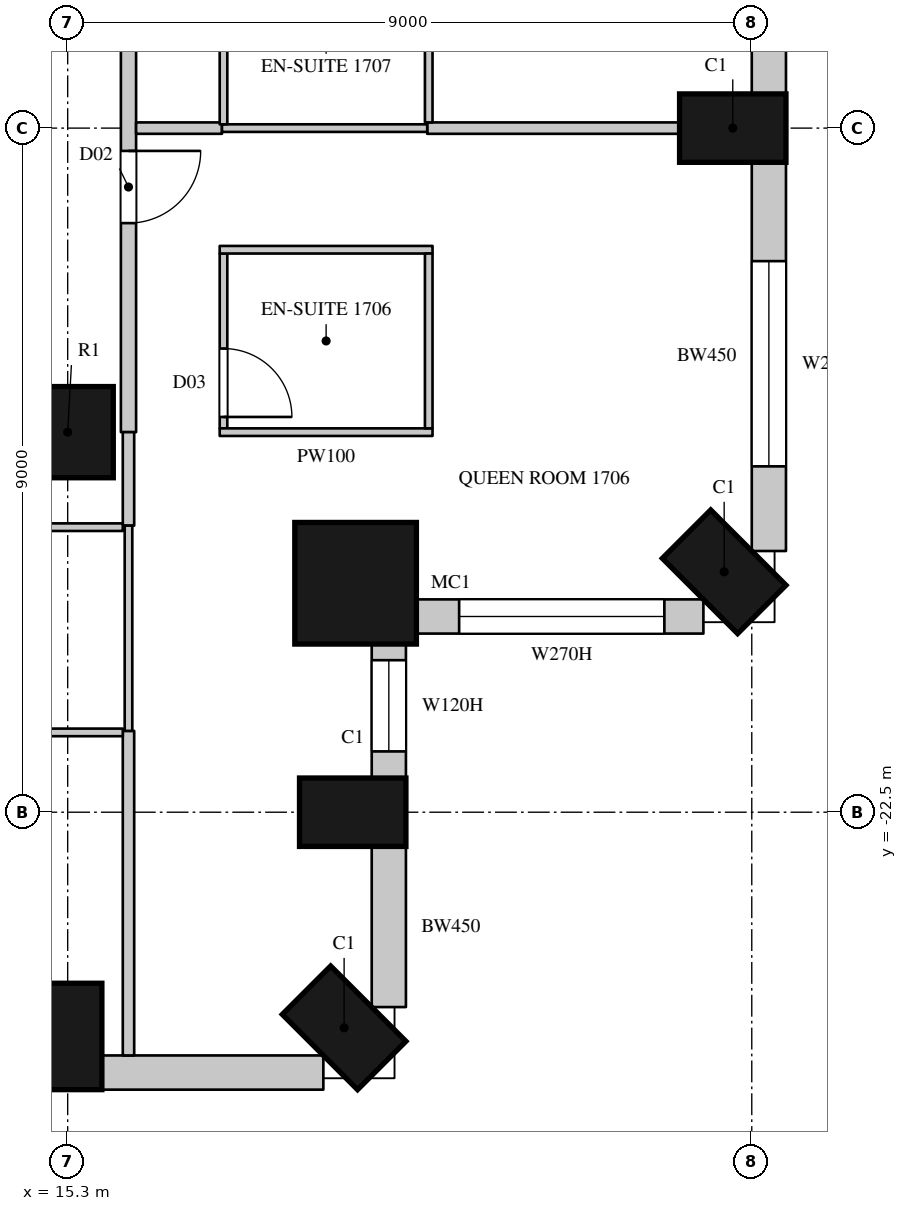
"""IFC4 building model, lengths in metres.
Left out: names, types, materials, properties, quantities, classifications, styles, units other than length and angle.
Written with IfcOpenShell. Run it as: python <this file> out.ifc"""

import sys

from ifc_helpers import new_model, si_unit, direction, frame, frame_2d, origin, origin_2d, place, context, subcontext, project, spatial, rectangle, circle, extrude, element, fill, save


model = new_model("IFC4")
c1 = context("Model", 3, precision=1e-05, world=origin(), true_north=direction((0.0, 1.0)))
c2 = subcontext(c1, "Body", "Model", "MODEL_VIEW")
j1 = project(units=[si_unit("LENGTHUNIT", "METRE"), si_unit("PLANEANGLEUNIT", "RADIAN")], contexts=[c1])
p1 = place(None, origin())
s1 = spatial("IfcSite", under=j1, at=p1, CompositionType="ELEMENT")
p2 = place(p1, origin())
s2 = spatial("IfcBuilding", under=s1, at=p2, CompositionType="ELEMENT")
p3 = place(p2, frame((0.0, 0.0, 91.5)))
s3 = spatial("IfcBuildingStorey", under=s2, at=p3, CompositionType="ELEMENT", Elevation=91.5)
for number, where, z_axis, x_axis in (
    (1, (15.3, -25.45, 0.0), (0.0, 0.0, 1.0), (1.0, 0.0, 0.0)),
    (2, (18.937, -25.337, 0.0), (0.0, 0.0, 1.0), (0.707, 0.707, 0.0)),
    (3, (19.05, -22.5, 0.0), (0.0, 0.0, 1.0), (0.0, 1.0, 0.0)),
):
    element("IfcColumn", number, at=place(p3, frame(where, z_axis=z_axis, x_axis=x_axis)), inside=s3, PredefinedType="COLUMN", context=c2, shape_type="SweptSolid", body=[
        extrude(rectangle(XDim=0.9, YDim=1.4, at=origin_2d()), origin(), (0.0, 0.0, 1.0), 3.6),
    ])
p4 = place(p3, frame((19.088, -19.488, 0.0), z_axis=(0.0, 0.0, 1.0), x_axis=(1.0, 0.0, 0.0)))
e4 = element("IfcColumn", 4, at=p4, inside=s3, PredefinedType="COLUMN", context=c2, shape_type="SweptSolid", body=[
    extrude(circle(Radius=0.8, at=origin_2d()), origin(), (0.0, 0.0, 1.0), 3.6),
])
for number, where, z_axis, x_axis in (
    (5, (23.937, -19.337, 0.0), (0.0, 0.0, 1.0), (0.707, 0.707, 0.0)),
    (6, (24.05, -13.5, 0.0), (0.0, 0.0, 1.0), (0.0, 1.0, 0.0)),
):
    element("IfcColumn", number, at=place(p3, frame(where, z_axis=z_axis, x_axis=x_axis)), inside=s3, PredefinedType="COLUMN", context=c2, shape_type="SweptSolid", body=[
        extrude(rectangle(XDim=0.9, YDim=1.4, at=origin_2d()), origin(), (0.0, 0.0, 1.0), 3.6),
    ])
p5 = place(p3, frame((15.3, -17.5, 0.0), z_axis=(0.0, 0.0, 1.0), x_axis=(1.0, 0.0, 0.0)))
e7 = element("IfcColumn", 7, at=p5, inside=s3, PredefinedType="COLUMN", context=c2, shape_type="SweptSolid", body=[
    extrude(circle(Radius=0.6, at=origin_2d()), origin(), (0.0, 0.0, 1.0), 3.6),
])
p6 = place(p3, frame((15.75, -25.925, 0.0), z_axis=(0.0, 0.0, 1.0), x_axis=(1.0, 0.0, 0.0)))
e8 = element("IfcWall", 8, at=p6, inside=s3, PredefinedType="SOLIDWALL", context=c2, shape_type="SweptSolid", body=[
    extrude(rectangle(XDim=2.914, YDim=0.45, at=frame_2d((1.457, 0.0))), origin(), (0.0, 0.0, 1.0), 3.3),
])
p7 = place(p3, frame((19.525, -25.064, 0.0), z_axis=(0.0, 0.0, 1.0), x_axis=(0.0, 1.0, 0.0)))
e9 = element("IfcWall", 9, at=p7, inside=s3, PredefinedType="SOLIDWALL", context=c2, shape_type="SweptSolid", body=[
    extrude(rectangle(XDim=2.114, YDim=0.45, at=frame_2d((1.057, 0.0))), origin(), (0.0, 0.0, 1.0), 3.3),
])
p8 = place(p3, frame((19.525, -22.05, 0.0), z_axis=(0.0, 0.0, 1.0), x_axis=(0.0, 1.0, 0.0)))
e10 = element("IfcWall", 10, at=p8, inside=s3, PredefinedType="SOLIDWALL", context=c2, shape_type="SweptSolid", body=[
    extrude(rectangle(XDim=1.792, YDim=0.45, at=frame_2d((0.896, 0.0))), origin(), (0.0, 0.0, 1.0), 3.3),
])
p9 = place(p8, frame((0.35, 0.0, 1.05)))
e11 = element("IfcOpeningElement", 11, at=p9, cuts=e10, PredefinedType="OPENING", context=c2, shape_type="SweptSolid", body=[
    extrude(rectangle(XDim=1.2, YDim=2.0, at=frame_2d((0.6, 1.0))), frame((0.0, 0.235, 0.0), z_axis=(0.0, -1.0, 0.0), x_axis=(1.0, 0.0, 0.0)), (0.0, 0.0, 1.0), 0.47),
])
p10 = place(p3, frame((19.858, -19.925, 0.0), z_axis=(0.0, 0.0, 1.0), x_axis=(1.0, 0.0, 0.0)))
e12 = element("IfcWall", 12, at=p10, inside=s3, PredefinedType="SOLIDWALL", context=c2, shape_type="SweptSolid", body=[
    extrude(rectangle(XDim=3.805, YDim=0.45, at=frame_2d((1.903, 0.0))), origin(), (0.0, 0.0, 1.0), 3.3),
])
p11 = place(p10, frame((0.592, 0.0, 1.05)))
e13 = element("IfcOpeningElement", 13, at=p11, cuts=e12, PredefinedType="OPENING", context=c2, shape_type="SweptSolid", body=[
    extrude(rectangle(XDim=2.7, YDim=2.0, at=frame_2d((1.35, 1.0))), frame((0.0, 0.235, 0.0), z_axis=(0.0, -1.0, 0.0), x_axis=(1.0, 0.0, 0.0)), (0.0, 0.0, 1.0), 0.47),
])
p12 = place(p3, frame((24.525, -19.064, 0.0), z_axis=(0.0, 0.0, 1.0), x_axis=(0.0, 1.0, 0.0)))
e14 = element("IfcWall", 14, at=p12, inside=s3, PredefinedType="SOLIDWALL", context=c2, shape_type="SweptSolid", body=[
    extrude(rectangle(XDim=5.114, YDim=0.45, at=frame_2d((2.557, 0.0))), origin(), (0.0, 0.0, 1.0), 3.3),
])
p13 = place(p12, frame((1.114, 0.0, 1.05)))
e15 = element("IfcOpeningElement", 15, at=p13, cuts=e14, PredefinedType="OPENING", context=c2, shape_type="SweptSolid", body=[
    extrude(rectangle(XDim=2.7, YDim=2.0, at=frame_2d((1.35, 1.0))), frame((0.0, 0.235, 0.0), z_axis=(0.0, -1.0, 0.0), x_axis=(1.0, 0.0, 0.0)), (0.0, 0.0, 1.0), 0.47),
])
p14 = place(p3, frame((24.525, -13.05, 0.0), z_axis=(0.0, 0.0, 1.0), x_axis=(0.0, 1.0, 0.0)))
e16 = element("IfcWall", 16, at=p14, inside=s3, PredefinedType="SOLIDWALL", context=c2, shape_type="SweptSolid", body=[
    extrude(rectangle(XDim=8.1, YDim=0.45, at=frame_2d((4.05, 0.0))), origin(), (0.0, 0.0, 1.0), 3.3),
])
p15 = place(p14, frame((0.9, 0.0, 0.0)))
e17 = element("IfcOpeningElement", 17, at=p15, cuts=e16, PredefinedType="OPENING", context=c2, shape_type="SweptSolid", body=[
    extrude(rectangle(XDim=1.8, YDim=2.4, at=frame_2d((0.9, 1.2))), frame((0.0, 0.235, 0.0), z_axis=(0.0, -1.0, 0.0), x_axis=(1.0, 0.0, 0.0)), (0.0, 0.0, 1.0), 0.47),
])
p16 = place(p14, frame((4.7, 0.0, 0.0)))
e18 = element("IfcOpeningElement", 18, at=p16, cuts=e16, PredefinedType="OPENING", context=c2, shape_type="SweptSolid", body=[
    extrude(rectangle(XDim=1.8, YDim=2.4, at=frame_2d((0.9, 1.2))), frame((0.0, 0.235, 0.0), z_axis=(0.0, -1.0, 0.0), x_axis=(1.0, 0.0, 0.0)), (0.0, 0.0, 1.0), 0.47),
])
p17 = place(p14, frame((6.7, 0.0, 1.05)))
e19 = element("IfcOpeningElement", 19, at=p17, cuts=e16, PredefinedType="OPENING", context=c2, shape_type="SweptSolid", body=[
    extrude(rectangle(XDim=1.2, YDim=2.0, at=frame_2d((0.6, 1.0))), frame((0.0, 0.235, 0.0), z_axis=(0.0, -1.0, 0.0), x_axis=(1.0, 0.0, 0.0)), (0.0, 0.0, 1.0), 0.47),
])
p18 = place(p3, frame((16.1, -17.5, 0.0), z_axis=(0.0, 0.0, 1.0), x_axis=(0.0, 1.0, 0.0)))
e20 = element("IfcWall", 20, at=p18, inside=s3, PredefinedType="PARTITIONING", context=c2, shape_type="SweptSolid", body=[
    extrude(rectangle(XDim=12.75, YDim=0.2, at=frame_2d((6.375, 0.0))), origin(), (0.0, 0.0, 1.0), 3.3),
])
p19 = place(p18, frame((2.75, 0.0, 0.0)))
e21 = element("IfcOpeningElement", 21, at=p19, cuts=e20, PredefinedType="OPENING", context=c2, shape_type="SweptSolid", body=[
    extrude(rectangle(XDim=0.95, YDim=2.2, at=frame_2d((0.475, 1.1))), frame((0.0, 0.11, 0.0), z_axis=(0.0, -1.0, 0.0), x_axis=(1.0, 0.0, 0.0)), (0.0, 0.0, 1.0), 0.22),
])
p20 = place(p18, frame((6.95, 0.0, 0.0)))
e22 = element("IfcOpeningElement", 22, at=p20, cuts=e20, PredefinedType="OPENING", context=c2, shape_type="SweptSolid", body=[
    extrude(rectangle(XDim=0.95, YDim=2.2, at=frame_2d((0.475, 1.1))), frame((0.0, 0.11, 0.0), z_axis=(0.0, -1.0, 0.0), x_axis=(1.0, 0.0, 0.0)), (0.0, 0.0, 1.0), 0.22),
])
p21 = place(p18, frame((11.4, 0.0, 0.0)))
e23 = element("IfcOpeningElement", 23, at=p21, cuts=e20, PredefinedType="OPENING", context=c2, shape_type="SweptSolid", body=[
    extrude(rectangle(XDim=0.95, YDim=2.2, at=frame_2d((0.475, 1.1))), frame((0.0, 0.11, 0.0), z_axis=(0.0, -1.0, 0.0), x_axis=(1.0, 0.0, 0.0)), (0.0, 0.0, 1.0), 0.22),
])
p22 = place(p3, frame((16.1, -25.7, 0.0), z_axis=(0.0, 0.0, 1.0), x_axis=(0.0, 1.0, 0.0)))
e24 = element("IfcWall", 24, at=p22, inside=s3, PredefinedType="PARTITIONING", context=c2, shape_type="SweptSolid", body=[
    extrude(rectangle(XDim=4.27, YDim=0.15, at=frame_2d((2.135, 0.0))), origin(), (0.0, 0.0, 1.0), 3.3),
])
p23 = place(p3, frame((16.1, -18.73, 0.0), z_axis=(0.0, 0.0, 1.0), x_axis=(0.0, 1.0, 0.0)))
e25 = element("IfcWall", 25, at=p23, inside=s3, PredefinedType="PARTITIONING", context=c2, shape_type="SweptSolid", body=[
    extrude(rectangle(XDim=1.23, YDim=0.15, at=frame_2d((0.615, 0.0))), origin(), (0.0, 0.0, 1.0), 3.3),
])
p24 = place(p3, frame((16.2, -13.5, 0.0), z_axis=(0.0, 0.0, 1.0), x_axis=(1.0, 0.0, 0.0)))
e26 = element("IfcWall", 26, at=p24, inside=s3, PredefinedType="PARTITIONING", context=c2, shape_type="SweptSolid", body=[
    extrude(rectangle(XDim=1.13, YDim=0.15, at=frame_2d((0.565, 0.0))), origin(), (0.0, 0.0, 1.0), 3.3),
])
p25 = place(p3, frame((20.03, -13.5, 0.0), z_axis=(0.0, 0.0, 1.0), x_axis=(1.0, 0.0, 0.0)))
e27 = element("IfcWall", 27, at=p25, inside=s3, PredefinedType="PARTITIONING", context=c2, shape_type="SweptSolid", body=[
    extrude(rectangle(XDim=3.32, YDim=0.15, at=frame_2d((1.66, 0.0))), origin(), (0.0, 0.0, 1.0), 3.3),
])
for number, where, z_axis, x_axis in (
    (28, (13.65, -21.45, 0.0), (0.0, 0.0, 1.0), (1.0, 0.0, 0.0)),
    (29, (13.65, -18.75, 0.0), (0.0, 0.0, 1.0), (1.0, 0.0, 0.0)),
):
    element("IfcWall", number, at=place(p3, frame(where, z_axis=z_axis, x_axis=x_axis)), inside=s3, PredefinedType="PARTITIONING", context=c2, shape_type="SweptSolid", body=[
        extrude(rectangle(XDim=2.375, YDim=0.1, at=frame_2d((1.188, 0.0))), origin(), (0.0, 0.0, 1.0), 3.3),
    ])
for number, where, z_axis, x_axis in (
    (30, (16.1, -21.43, 0.0), (0.0, 0.0, 1.0), (0.0, 1.0, 0.0)),
    (31, (17.33, -13.5, 0.0), (0.0, 0.0, 1.0), (1.0, 0.0, 0.0)),
):
    element("IfcWall", number, at=place(p3, frame(where, z_axis=z_axis, x_axis=x_axis)), inside=s3, PredefinedType="PARTITIONING", context=c2, shape_type="SweptSolid", body=[
        extrude(rectangle(XDim=2.7, YDim=0.1, at=frame_2d((1.35, 0.0))), origin(), (0.0, 0.0, 1.0), 3.3),
    ])
p26 = place(p3, frame((17.35, -17.45, 0.0), z_axis=(0.0, 0.0, 1.0), x_axis=(0.0, 1.0, 0.0)))
e32 = element("IfcWall", 32, at=p26, inside=s3, PredefinedType="PARTITIONING", context=c2, shape_type="SweptSolid", body=[
    extrude(rectangle(XDim=2.3, YDim=0.1, at=frame_2d((1.15, 0.0))), origin(), (0.0, 0.0, 1.0), 3.3),
])
p27 = place(p26, frame((0.15, 0.0, 0.0)))
e33 = element("IfcOpeningElement", 33, at=p27, cuts=e32, PredefinedType="OPENING", context=c2, shape_type="SweptSolid", body=[
    extrude(rectangle(XDim=0.9, YDim=2.2, at=frame_2d((0.45, 1.1))), frame((0.0, 0.06, 0.0), z_axis=(0.0, -1.0, 0.0), x_axis=(1.0, 0.0, 0.0)), (0.0, 0.0, 1.0), 0.12),
])
for number, where, z_axis, x_axis in (
    (34, (17.3, -17.5, 0.0), (0.0, 0.0, 1.0), (1.0, 0.0, 0.0)),
    (35, (17.3, -15.1, 0.0), (0.0, 0.0, 1.0), (1.0, 0.0, 0.0)),
):
    element("IfcWall", number, at=place(p3, frame(where, z_axis=z_axis, x_axis=x_axis)), inside=s3, PredefinedType="PARTITIONING", context=c2, shape_type="SweptSolid", body=[
        extrude(rectangle(XDim=2.8, YDim=0.1, at=frame_2d((1.4, 0.0))), origin(), (0.0, 0.0, 1.0), 3.3),
    ])
p28 = place(p3, frame((17.35, -13.45, 0.0), z_axis=(0.0, 0.0, 1.0), x_axis=(0.0, 1.0, 0.0)))
e36 = element("IfcWall", 36, at=p28, inside=s3, PredefinedType="PARTITIONING", context=c2, shape_type="SweptSolid", body=[
    extrude(rectangle(XDim=2.296, YDim=0.1, at=frame_2d((1.148, 0.0))), origin(), (0.0, 0.0, 1.0), 3.3),
])
p29 = place(p28, frame((1.2, 0.0, 0.0)))
e37 = element("IfcOpeningElement", 37, at=p29, cuts=e36, PredefinedType="OPENING", context=c2, shape_type="SweptSolid", body=[
    extrude(rectangle(XDim=0.9, YDim=2.2, at=frame_2d((0.45, 1.1))), frame((0.0, 0.06, 0.0), z_axis=(0.0, -1.0, 0.0), x_axis=(1.0, 0.0, 0.0)), (0.0, 0.0, 1.0), 0.12),
])
p30 = place(p3, frame((20.05, -17.45, 0.0), z_axis=(0.0, 0.0, 1.0), x_axis=(0.0, 1.0, 0.0)))
e38 = element("IfcWall", 38, at=p30, inside=s3, PredefinedType="PARTITIONING", context=c2, shape_type="SweptSolid", body=[
    extrude(rectangle(XDim=2.3, YDim=0.1, at=frame_2d((1.15, 0.0))), origin(), (0.0, 0.0, 1.0), 3.3),
])
p31 = place(p3, frame((20.05, -13.425, 0.0), z_axis=(0.0, 0.0, 1.0), x_axis=(0.0, 1.0, 0.0)))
e39 = element("IfcWall", 39, at=p31, inside=s3, PredefinedType="PARTITIONING", context=c2, shape_type="SweptSolid", body=[
    extrude(rectangle(XDim=2.271, YDim=0.1, at=frame_2d((1.135, 0.0))), origin(), (0.0, 0.0, 1.0), 3.3),
])
p32 = place(p9, origin())
e40 = element("IfcWindow", 40, at=p32, inside=s3, PartitioningType="SINGLE_PANEL", PredefinedType="WINDOW", context=c2, shape_type="SweptSolid", body=[
    extrude(rectangle(XDim=1.2, YDim=2.0, at=frame_2d((0.6, 1.0))), frame((0.0, 0.135, 0.0), z_axis=(0.0, -1.0, 0.0), x_axis=(1.0, 0.0, 0.0)), (0.0, 0.0, 1.0), 0.06),
])
fill(e11, e40)
p33 = place(p11, origin())
e41 = element("IfcWindow", 41, at=p33, inside=s3, PartitioningType="SINGLE_PANEL", PredefinedType="WINDOW", context=c2, shape_type="SweptSolid", body=[
    extrude(rectangle(XDim=2.7, YDim=2.0, at=frame_2d((1.35, 1.0))), frame((0.0, 0.135, 0.0), z_axis=(0.0, -1.0, 0.0), x_axis=(1.0, 0.0, 0.0)), (0.0, 0.0, 1.0), 0.06),
])
fill(e13, e41)
p34 = place(p13, origin())
e42 = element("IfcWindow", 42, at=p34, inside=s3, PartitioningType="SINGLE_PANEL", PredefinedType="WINDOW", context=c2, shape_type="SweptSolid", body=[
    extrude(rectangle(XDim=2.7, YDim=2.0, at=frame_2d((1.35, 1.0))), frame((0.0, 0.135, 0.0), z_axis=(0.0, -1.0, 0.0), x_axis=(1.0, 0.0, 0.0)), (0.0, 0.0, 1.0), 0.06),
])
fill(e15, e42)
p35 = place(p19, origin())
e43 = element("IfcDoor", 43, at=p35, inside=s3, OperationType="SINGLE_SWING_LEFT", PredefinedType="DOOR", context=c2, shape_type="SweptSolid", body=[
    extrude(rectangle(XDim=0.95, YDim=2.2, at=frame_2d((0.475, 1.1))), frame((0.0, 0.025, 0.0), z_axis=(0.0, -1.0, 0.0), x_axis=(1.0, 0.0, 0.0)), (0.0, 0.0, 1.0), 0.05),
])
fill(e21, e43)
p36 = place(p27, origin())
e44 = element("IfcDoor", 44, at=p36, inside=s3, OperationType="SINGLE_SWING_RIGHT", PredefinedType="DOOR", context=c2, shape_type="SweptSolid", body=[
    extrude(rectangle(XDim=0.9, YDim=2.2, at=frame_2d((0.45, 1.1))), frame((0.0, 0.025, 0.0), z_axis=(0.0, -1.0, 0.0), x_axis=(1.0, 0.0, 0.0)), (0.0, 0.0, 1.0), 0.05),
])
fill(e33, e44)
save(model, sys.argv[1])
